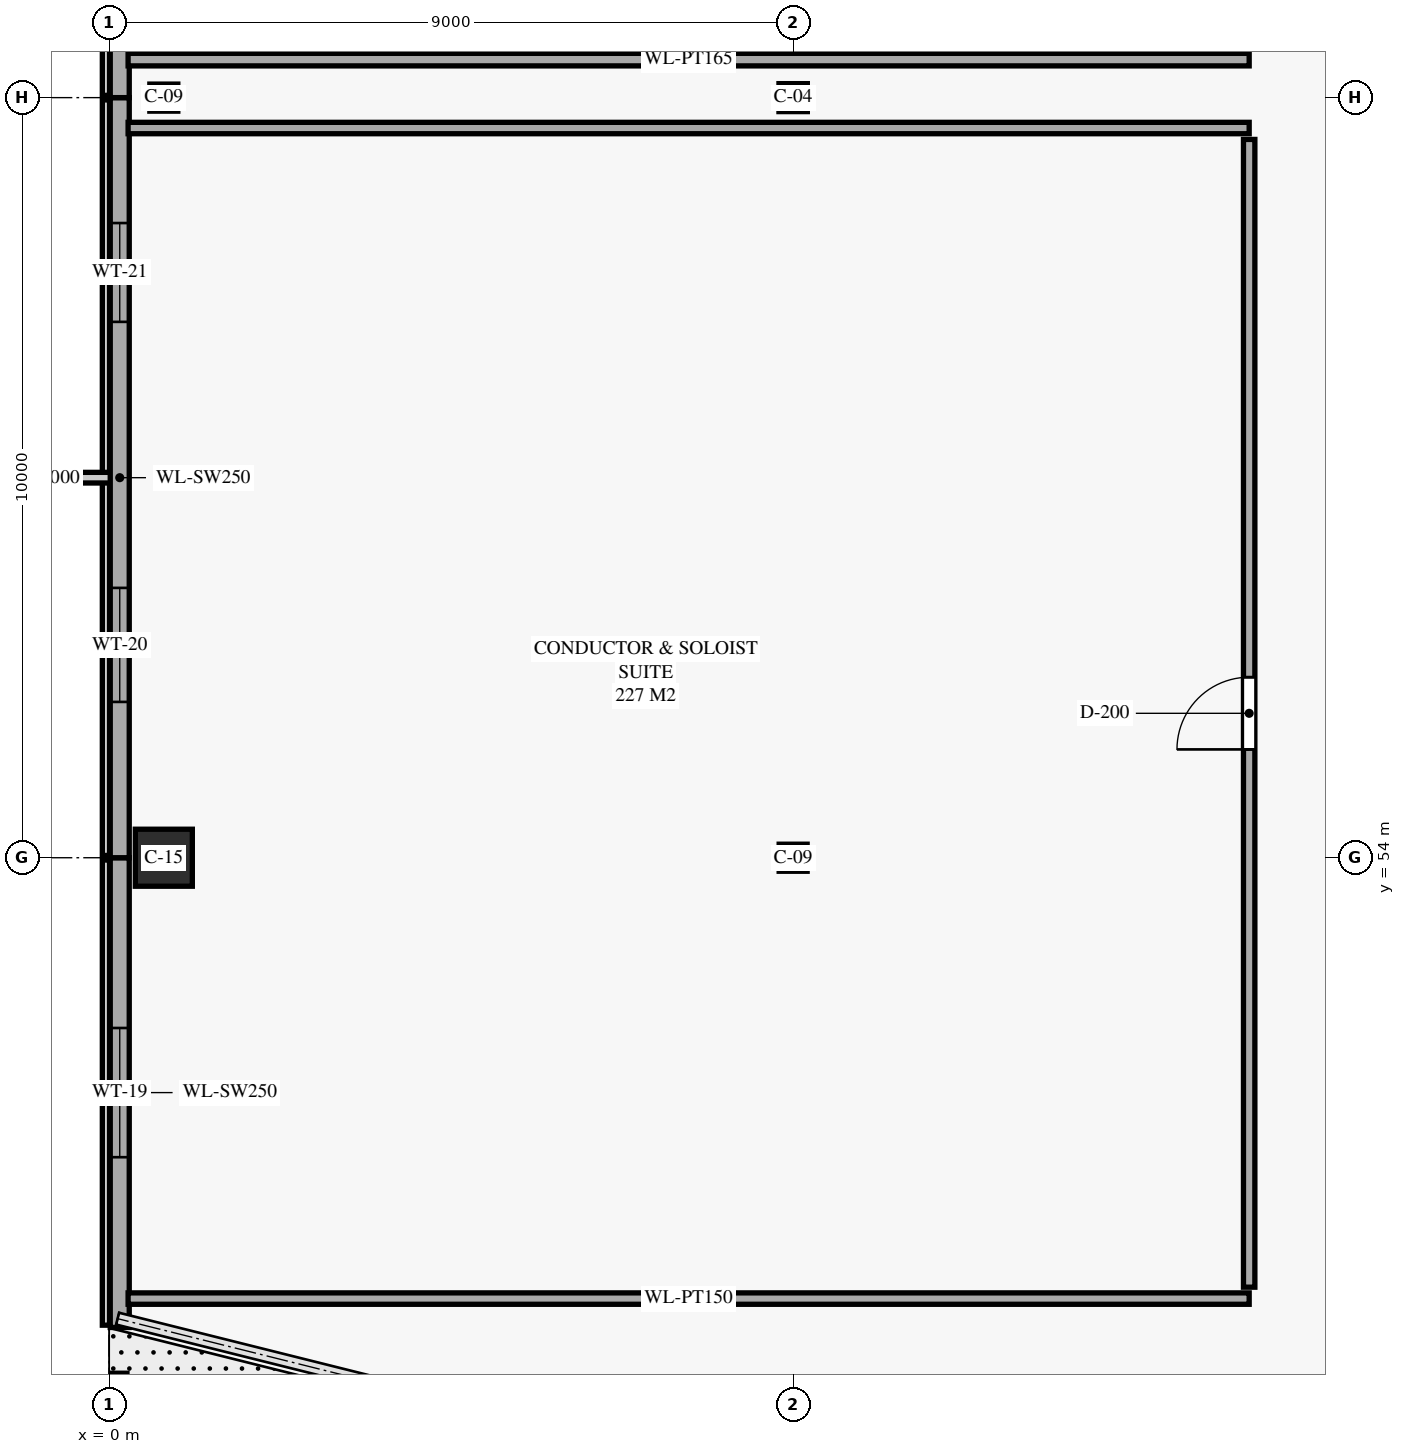
"""IFC4 building model, lengths in metres.
Left out: names, types, materials, properties, quantities, classifications, styles, units other than length and angle.
Written with IfcOpenShell. Run it as: python <this file> out.ifc"""

import sys

from ifc_helpers import new_model, si_unit, direction, frame, frame_2d, origin, origin_2d, place, context, subcontext, project, spatial, rectangle, i_section, extrude, element, fill, save


model = new_model("IFC4")
c1 = context("Model", 3, precision=1e-05, world=origin(), true_north=direction((0.0, 1.0)))
c2 = subcontext(c1, "Body", "Model", "MODEL_VIEW")
j1 = project(units=[si_unit("LENGTHUNIT", "METRE"), si_unit("PLANEANGLEUNIT", "RADIAN")], contexts=[c1])
p1 = place(None, origin())
s1 = spatial("IfcSite", under=j1, at=p1, CompositionType="ELEMENT")
p2 = place(p1, origin())
s2 = spatial("IfcBuilding", under=s1, at=p2, CompositionType="ELEMENT")
p3 = place(p2, frame((0.0, 0.0, 5.0)))
s3 = spatial("IfcBuildingStorey", under=s2, at=p3, CompositionType="ELEMENT", Elevation=5.0)
p4 = place(p3, frame((0.72, 54.0, 0.0), z_axis=(0.0, 0.0, 1.0), x_axis=(1.0, 0.0, 0.0)))
e1 = element("IfcColumn", 1, at=p4, inside=s3, PredefinedType="COLUMN", context=c2, shape_type="SweptSolid", body=[
    extrude(rectangle(XDim=0.75, YDim=0.75, at=origin_2d()), origin(), (0.0, 0.0, 1.0), 4.64),
])
p5 = place(p3, frame((0.72, 64.0, 0.0), z_axis=(0.0, 0.0, 1.0), x_axis=(1.0, 0.0, 0.0)))
e2 = element("IfcColumn", 2, at=p5, inside=s3, PredefinedType="COLUMN", context=c2, shape_type="SweptSolid", body=[
    extrude(i_section(OverallWidth=0.368, OverallDepth=0.356, WebThickness=0.011, FlangeThickness=0.018, FilletRadius=0.015, at=origin_2d()), origin(), (0.0, 0.0, 1.0), 5.0),
])
p6 = place(p3, frame((9.0, 54.0, 0.0), z_axis=(0.0, 0.0, 1.0), x_axis=(1.0, 0.0, 0.0)))
e3 = element("IfcColumn", 3, at=p6, inside=s3, PredefinedType="COLUMN", context=c2, shape_type="SweptSolid", body=[
    extrude(i_section(OverallWidth=0.368, OverallDepth=0.356, WebThickness=0.011, FlangeThickness=0.018, FilletRadius=0.015, at=origin_2d()), origin(), (0.0, 0.0, 1.0), 4.64),
])
p7 = place(p3, frame((9.0, 64.0, 0.0), z_axis=(0.0, 0.0, 1.0), x_axis=(1.0, 0.0, 0.0)))
e4 = element("IfcColumn", 4, at=p7, inside=s3, PredefinedType="COLUMN", context=c2, shape_type="SweptSolid", body=[
    extrude(i_section(OverallWidth=0.373, OverallDepth=0.368, WebThickness=0.015, FlangeThickness=0.024, FilletRadius=0.015, at=origin_2d()), origin(), (0.0, 0.0, 1.0), 5.0),
])
p8 = place(p3, frame((0.14, 47.82, 0.0), z_axis=(0.0, 0.0, 1.0), x_axis=(0.0, 1.0, 0.0)))
e5 = element("IfcWall", 5, at=p8, inside=s3, PredefinedType="SOLIDWALL", context=c2, shape_type="SweptSolid", body=[
    extrude(rectangle(XDim=6.18, YDim=0.25, at=frame_2d((3.09, 0.0))), origin(), (0.0, 0.0, 1.0), 4.68),
])
p9 = place(p8, frame((2.24, 0.0, 0.8)))
e6 = element("IfcOpeningElement", 6, at=p9, cuts=e5, PredefinedType="OPENING", context=c2, shape_type="SweptSolid", body=[
    extrude(rectangle(XDim=1.7, YDim=1.8, at=frame_2d((0.85, 0.9))), frame((0.0, 0.135, 0.0), z_axis=(0.0, -1.0, 0.0), x_axis=(1.0, 0.0, 0.0)), (0.0, 0.0, 1.0), 0.27),
])
p10 = place(p3, frame((0.14, 54.0, 0.0), z_axis=(0.0, 0.0, 1.0), x_axis=(0.0, 1.0, 0.0)))
e7 = element("IfcWall", 7, at=p10, inside=s3, PredefinedType="SOLIDWALL", context=c2, shape_type="SweptSolid", body=[
    extrude(rectangle(XDim=10.0, YDim=0.25, at=frame_2d((5.0, 0.0))), origin(), (0.0, 0.0, 1.0), 4.68),
])
p11 = place(p10, frame((2.05, 0.0, 0.8)))
e8 = element("IfcOpeningElement", 8, at=p11, cuts=e7, PredefinedType="OPENING", context=c2, shape_type="SweptSolid", body=[
    extrude(rectangle(XDim=1.5, YDim=1.8, at=frame_2d((0.75, 0.9))), frame((0.0, 0.135, 0.0), z_axis=(0.0, -1.0, 0.0), x_axis=(1.0, 0.0, 0.0)), (0.0, 0.0, 1.0), 0.27),
])
p12 = place(p10, frame((7.05, 0.0, 0.8)))
e9 = element("IfcOpeningElement", 9, at=p12, cuts=e7, PredefinedType="OPENING", context=c2, shape_type="SweptSolid", body=[
    extrude(rectangle(XDim=1.3, YDim=1.8, at=frame_2d((0.65, 0.9))), frame((0.0, 0.135, 0.0), z_axis=(0.0, -1.0, 0.0), x_axis=(1.0, 0.0, 0.0)), (0.0, 0.0, 1.0), 0.27),
])
p13 = place(p3, frame((0.14, 64.0, 0.0), z_axis=(0.0, 0.0, 1.0), x_axis=(0.0, 1.0, 0.0)))
e10 = element("IfcWall", 10, at=p13, inside=s3, PredefinedType="SOLIDWALL", context=c2, shape_type="SweptSolid", body=[
    extrude(rectangle(XDim=10.0, YDim=0.25, at=frame_2d((5.0, 0.0))), origin(), (0.0, 0.0, 1.0), 4.68),
])
p14 = place(p13, frame((2.25, 0.0, 0.8)))
e11 = element("IfcOpeningElement", 11, at=p14, cuts=e10, PredefinedType="OPENING", context=c2, shape_type="SweptSolid", body=[
    extrude(rectangle(XDim=1.1, YDim=1.8, at=frame_2d((0.55, 0.9))), frame((0.0, 0.135, 0.0), z_axis=(0.0, -1.0, 0.0), x_axis=(1.0, 0.0, 0.0)), (0.0, 0.0, 1.0), 0.27),
])
p15 = place(p13, frame((6.4, 0.0, 0.8)))
e12 = element("IfcOpeningElement", 12, at=p15, cuts=e10, PredefinedType="OPENING", context=c2, shape_type="SweptSolid", body=[
    extrude(rectangle(XDim=1.6, YDim=1.5, at=frame_2d((0.8, 0.75))), frame((0.0, 0.135, 0.0), z_axis=(0.0, -1.0, 0.0), x_axis=(1.0, 0.0, 0.0)), (0.0, 0.0, 1.0), 0.27),
])
p16 = place(p3, frame((0.14, 17.14, 0.0), z_axis=(0.0, 0.0, 1.0), x_axis=(0.0, 1.0, 0.0)))
e13 = element("IfcWall", 13, at=p16, inside=s3, PredefinedType="PARAPET", context=c2, shape_type="SweptSolid", body=[
    extrude(rectangle(XDim=30.078, YDim=0.19, at=frame_2d((15.039, 0.0))), origin(), (0.0, 0.0, 1.0), 0.95),
])
p17 = place(p3, frame((0.25, 64.5, 0.0), z_axis=(0.0, 0.0, 1.0), x_axis=(1.0, 0.0, 0.0)))
e14 = element("IfcWall", 14, at=p17, inside=s3, PredefinedType="PARTITIONING", context=c2, shape_type="SweptSolid", body=[
    extrude(rectangle(XDim=14.75, YDim=0.165, at=frame_2d((7.375, 0.0))), origin(), (0.0, 0.0, 1.0), 4.68),
])
for number, where, z_axis, x_axis in (
    (15, (0.25, 48.2, 0.0), (0.0, 0.0, 1.0), (1.0, 0.0, 0.0)),
    (16, (15.0, 63.6, 0.0), (0.0, 0.0, 1.0), (-1.0, 0.0, 0.0)),
):
    element("IfcWall", number, at=place(p3, frame(where, z_axis=z_axis, x_axis=x_axis)), inside=s3, PredefinedType="PARTITIONING", context=c2, shape_type="SweptSolid", body=[
        extrude(rectangle(XDim=14.75, YDim=0.15, at=frame_2d((7.375, 0.0))), origin(), (0.0, 0.0, 1.0), 4.68),
    ])
p18 = place(p3, frame((15.0, 48.35, 0.0), z_axis=(0.0, 0.0, 1.0), x_axis=(0.0, 1.0, 0.0)))
e17 = element("IfcWall", 17, at=p18, inside=s3, PredefinedType="PARTITIONING", context=c2, shape_type="SweptSolid", body=[
    extrude(rectangle(XDim=15.1, YDim=0.15, at=frame_2d((7.55, 0.0))), origin(), (0.0, 0.0, 1.0), 4.68),
])
p19 = place(p18, frame((7.075, 0.0, 0.0)))
e18 = element("IfcOpeningElement", 18, at=p19, cuts=e17, PredefinedType="OPENING", context=c2, shape_type="SweptSolid", body=[
    extrude(rectangle(XDim=0.95, YDim=2.15, at=frame_2d((0.475, 1.075))), frame((0.0, 0.085, 0.0), z_axis=(0.0, -1.0, 0.0), x_axis=(1.0, 0.0, 0.0)), (0.0, 0.0, 1.0), 0.17),
])
p20 = place(p9, origin())
e19 = element("IfcWindow", 19, at=p20, inside=s3, PartitioningType="SINGLE_PANEL", PredefinedType="WINDOW", context=c2, shape_type="SweptSolid", body=[
    extrude(rectangle(XDim=1.7, YDim=1.8, at=frame_2d((0.85, 0.9))), frame((0.0, 0.03, 0.0), z_axis=(0.0, -1.0, 0.0), x_axis=(1.0, 0.0, 0.0)), (0.0, 0.0, 1.0), 0.06),
])
fill(e6, e19)
p21 = place(p11, origin())
e20 = element("IfcWindow", 20, at=p21, inside=s3, PartitioningType="SINGLE_PANEL", PredefinedType="WINDOW", context=c2, shape_type="SweptSolid", body=[
    extrude(rectangle(XDim=1.5, YDim=1.8, at=frame_2d((0.75, 0.9))), frame((0.0, 0.03, 0.0), z_axis=(0.0, -1.0, 0.0), x_axis=(1.0, 0.0, 0.0)), (0.0, 0.0, 1.0), 0.06),
])
fill(e8, e20)
p22 = place(p12, origin())
e21 = element("IfcWindow", 21, at=p22, inside=s3, PartitioningType="SINGLE_PANEL", PredefinedType="WINDOW", context=c2, shape_type="SweptSolid", body=[
    extrude(rectangle(XDim=1.3, YDim=1.8, at=frame_2d((0.65, 0.9))), frame((0.0, 0.03, 0.0), z_axis=(0.0, -1.0, 0.0), x_axis=(1.0, 0.0, 0.0)), (0.0, 0.0, 1.0), 0.06),
])
fill(e9, e21)
p23 = place(p19, origin())
e22 = element("IfcDoor", 22, at=p23, inside=s3, OperationType="SINGLE_SWING_LEFT", PredefinedType="DOOR", context=c2, shape_type="SweptSolid", body=[
    extrude(rectangle(XDim=0.95, YDim=2.15, at=frame_2d((0.475, 1.075))), frame((0.0, 0.025, 0.0), z_axis=(0.0, -1.0, 0.0), x_axis=(1.0, 0.0, 0.0)), (0.0, 0.0, 1.0), 0.05),
])
fill(e18, e22)
save(model, sys.argv[1])
